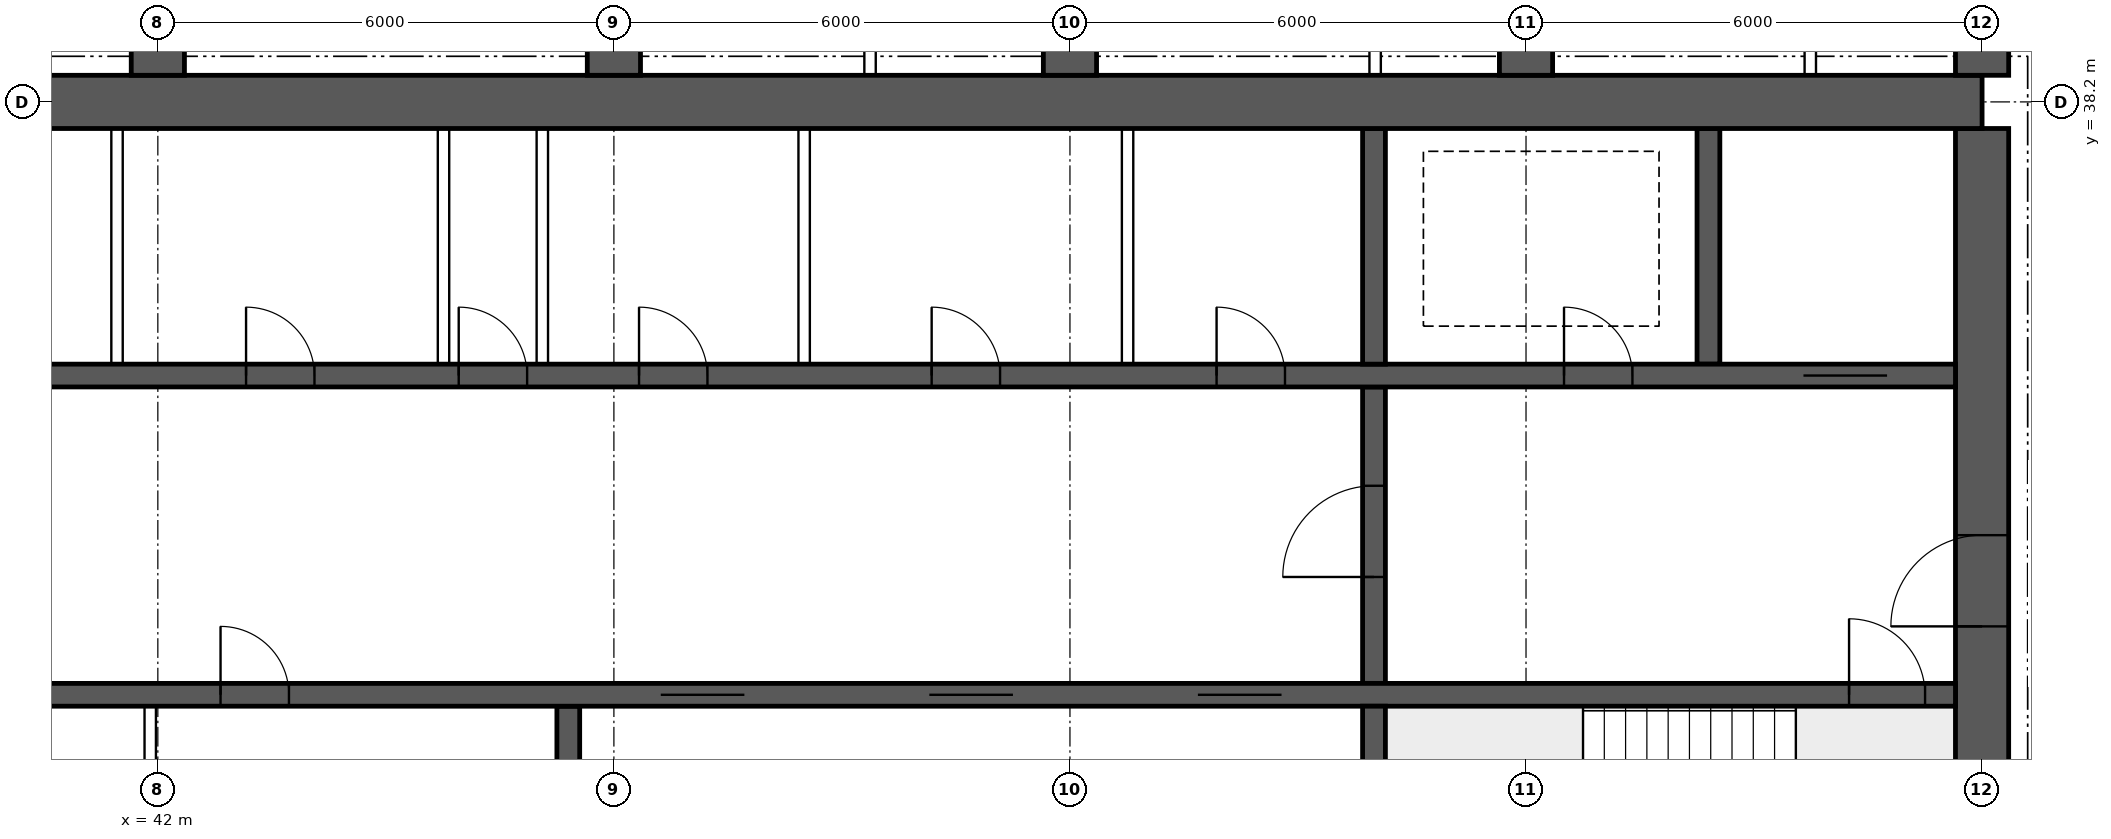
"""IFC4 building model, lengths in metres.
Left out: names, types, materials, properties, quantities, classifications, styles, units other than length and angle.
Written with IfcOpenShell. Run it as: python <this file> out.ifc"""

import sys

from ifc_helpers import new_model, si_unit, direction, frame, frame_2d, origin, place, context, subcontext, project, spatial, rectangle, extrude, element, fill, save


model = new_model("IFC4")
c1 = context("Model", 3, precision=1e-05, world=origin(), true_north=direction((0.0, 1.0)))
c2 = subcontext(c1, "Body", "Model", "MODEL_VIEW")
j1 = project(units=[si_unit("LENGTHUNIT", "METRE"), si_unit("PLANEANGLEUNIT", "RADIAN")], contexts=[c1])
p1 = place(None, origin())
s1 = spatial("IfcSite", under=j1, at=p1, CompositionType="ELEMENT")
p2 = place(p1, origin())
s2 = spatial("IfcBuilding", under=s1, at=p2, CompositionType="ELEMENT")
p3 = place(p2, frame((0.0, 0.0, 216.55)))
s3 = spatial("IfcBuildingStorey", under=s2, at=p3, CompositionType="ELEMENT", Elevation=216.55)
p4 = place(p3, frame((18.0, 38.2, 0.0), z_axis=(0.0, 0.0, 1.0), x_axis=(1.0, 0.0, 0.0)))
e1 = element("IfcWall", 1, at=p4, inside=s3, PredefinedType="SHEAR", context=c2, shape_type="SweptSolid", body=[
    extrude(rectangle(XDim=48.0, YDim=0.7, at=frame_2d((24.0, 0.0))), origin(), (0.0, 0.0, 1.0), 3.75),
])
p5 = place(p3, frame((66.0, 26.15, 0.0), z_axis=(0.0, 0.0, 1.0), x_axis=(0.0, 1.0, 0.0)))
e2 = element("IfcWall", 2, at=p5, inside=s3, PredefinedType="SHEAR", context=c2, shape_type="SweptSolid", body=[
    extrude(rectangle(XDim=11.7, YDim=0.7, at=frame_2d((5.85, 0.0))), origin(), (0.0, 0.0, 1.0), 3.75),
])
p6 = place(p5, frame((5.15, 0.0, 0.0)))
e3 = element("IfcOpeningElement", 3, at=p6, cuts=e2, PredefinedType="OPENING", context=c2, shape_type="SweptSolid", body=[
    extrude(rectangle(XDim=1.2, YDim=2.1, at=frame_2d((0.6, 1.05))), frame((0.0, 0.36, 0.0), z_axis=(0.0, -1.0, 0.0), x_axis=(1.0, 0.0, 0.0)), (0.0, 0.0, 1.0), 0.72),
])
p7 = place(p3, frame((18.35, 30.4, 0.0), z_axis=(0.0, 0.0, 1.0), x_axis=(1.0, 0.0, 0.0)))
e4 = element("IfcWall", 4, at=p7, inside=s3, PredefinedType="SHEAR", context=c2, shape_type="SweptSolid", body=[
    extrude(rectangle(XDim=47.3, YDim=0.3, at=frame_2d((23.65, 0.0))), origin(), (0.0, 0.0, 1.0), 3.75),
])
p8 = place(p7, frame((0.4, 0.0, 0.0)))
e5 = element("IfcOpeningElement", 5, at=p8, cuts=e4, PredefinedType="OPENING", context=c2, shape_type="SweptSolid", body=[
    extrude(rectangle(XDim=1.0, YDim=2.1, at=frame_2d((0.5, 1.05))), frame((0.0, 0.16, 0.0), z_axis=(0.0, -1.0, 0.0), x_axis=(1.0, 0.0, 0.0)), (0.0, 0.0, 1.0), 0.32),
])
p9 = place(p7, frame((45.9, 0.0, 0.0)))
e6 = element("IfcOpeningElement", 6, at=p9, cuts=e4, PredefinedType="OPENING", context=c2, shape_type="SweptSolid", body=[
    extrude(rectangle(XDim=1.0, YDim=2.1, at=frame_2d((0.5, 1.05))), frame((0.0, 0.16, 0.0), z_axis=(0.0, -1.0, 0.0), x_axis=(1.0, 0.0, 0.0)), (0.0, 0.0, 1.0), 0.32),
])
p10 = place(p7, frame((8.4, 0.0, 0.0)))
e7 = element("IfcOpeningElement", 7, at=p10, cuts=e4, PredefinedType="OPENING", context=c2, shape_type="SweptSolid", body=[
    extrude(rectangle(XDim=1.1, YDim=2.1, at=frame_2d((0.55, 1.05))), frame((0.0, 0.16, 0.0), z_axis=(0.0, -1.0, 0.0), x_axis=(1.0, 0.0, 0.0)), (0.0, 0.0, 1.0), 0.32),
])
p11 = place(p7, frame((11.0, 0.0, 0.0)))
e8 = element("IfcOpeningElement", 8, at=p11, cuts=e4, PredefinedType="OPENING", context=c2, shape_type="SweptSolid", body=[
    extrude(rectangle(XDim=1.1, YDim=2.1, at=frame_2d((0.55, 1.05))), frame((0.0, 0.16, 0.0), z_axis=(0.0, -1.0, 0.0), x_axis=(1.0, 0.0, 0.0)), (0.0, 0.0, 1.0), 0.32),
])
p12 = place(p7, frame((13.6, 0.0, 0.0)))
e9 = element("IfcOpeningElement", 9, at=p12, cuts=e4, PredefinedType="OPENING", context=c2, shape_type="SweptSolid", body=[
    extrude(rectangle(XDim=1.1, YDim=2.1, at=frame_2d((0.55, 1.05))), frame((0.0, 0.16, 0.0), z_axis=(0.0, -1.0, 0.0), x_axis=(1.0, 0.0, 0.0)), (0.0, 0.0, 1.0), 0.32),
])
p13 = place(p7, frame((16.2, 0.0, 0.0)))
e10 = element("IfcOpeningElement", 10, at=p13, cuts=e4, PredefinedType="OPENING", context=c2, shape_type="SweptSolid", body=[
    extrude(rectangle(XDim=1.1, YDim=2.1, at=frame_2d((0.55, 1.05))), frame((0.0, 0.16, 0.0), z_axis=(0.0, -1.0, 0.0), x_axis=(1.0, 0.0, 0.0)), (0.0, 0.0, 1.0), 0.32),
])
p14 = place(p7, frame((18.975, 0.0, 0.0)))
e11 = element("IfcOpeningElement", 11, at=p14, cuts=e4, PredefinedType="OPENING", context=c2, shape_type="SweptSolid", body=[
    extrude(rectangle(XDim=0.9, YDim=2.1, at=frame_2d((0.45, 1.05))), frame((0.0, 0.16, 0.0), z_axis=(0.0, -1.0, 0.0), x_axis=(1.0, 0.0, 0.0)), (0.0, 0.0, 1.0), 0.32),
])
p15 = place(p7, frame((24.475, 0.0, 0.0)))
e12 = element("IfcOpeningElement", 12, at=p15, cuts=e4, PredefinedType="OPENING", context=c2, shape_type="SweptSolid", body=[
    extrude(rectangle(XDim=0.9, YDim=2.1, at=frame_2d((0.45, 1.05))), frame((0.0, 0.16, 0.0), z_axis=(0.0, -1.0, 0.0), x_axis=(1.0, 0.0, 0.0)), (0.0, 0.0, 1.0), 0.32),
])
p16 = place(p7, frame((30.267, 0.0, 0.0)))
e13 = element("IfcOpeningElement", 13, at=p16, cuts=e4, PredefinedType="OPENING", context=c2, shape_type="SweptSolid", body=[
    extrude(rectangle(XDim=1.1, YDim=2.1, at=frame_2d((0.55, 1.05))), frame((0.0, 0.16, 0.0), z_axis=(0.0, -1.0, 0.0), x_axis=(1.0, 0.0, 0.0)), (0.0, 0.0, 1.0), 0.32),
])
p17 = place(p7, frame((33.8, 0.0, 0.0)))
e14 = element("IfcOpeningElement", 14, at=p17, cuts=e4, PredefinedType="OPENING", context=c2, shape_type="SweptSolid", body=[
    extrude(rectangle(XDim=1.1, YDim=2.1, at=frame_2d((0.55, 1.05))), frame((0.0, 0.16, 0.0), z_axis=(0.0, -1.0, 0.0), x_axis=(1.0, 0.0, 0.0)), (0.0, 0.0, 1.0), 0.32),
])
p18 = place(p7, frame((37.333, 0.0, 0.0)))
e15 = element("IfcOpeningElement", 15, at=p18, cuts=e4, PredefinedType="OPENING", context=c2, shape_type="SweptSolid", body=[
    extrude(rectangle(XDim=1.1, YDim=2.1, at=frame_2d((0.55, 1.05))), frame((0.0, 0.16, 0.0), z_axis=(0.0, -1.0, 0.0), x_axis=(1.0, 0.0, 0.0)), (0.0, 0.0, 1.0), 0.32),
])
p19 = place(p3, frame((18.35, 34.6, 0.0), z_axis=(0.0, 0.0, 1.0), x_axis=(1.0, 0.0, 0.0)))
e16 = element("IfcWall", 16, at=p19, inside=s3, PredefinedType="SHEAR", context=c2, shape_type="SweptSolid", body=[
    extrude(rectangle(XDim=47.3, YDim=0.3, at=frame_2d((23.65, 0.0))), origin(), (0.0, 0.0, 1.0), 3.75),
])
p20 = place(p19, frame((0.9, 0.0, 0.0)))
e17 = element("IfcOpeningElement", 17, at=p20, cuts=e16, PredefinedType="OPENING", context=c2, shape_type="SweptSolid", body=[
    extrude(rectangle(XDim=1.1, YDim=2.1, at=frame_2d((0.55, 1.05))), frame((0.0, 0.16, 0.0), z_axis=(0.0, -1.0, 0.0), x_axis=(1.0, 0.0, 0.0)), (0.0, 0.0, 1.0), 0.32),
])
p21 = place(p19, frame((45.3, 0.0, 0.0)))
e18 = element("IfcOpeningElement", 18, at=p21, cuts=e16, PredefinedType="OPENING", context=c2, shape_type="SweptSolid", body=[
    extrude(rectangle(XDim=1.1, YDim=2.1, at=frame_2d((0.55, 1.05))), frame((0.0, 0.16, 0.0), z_axis=(0.0, -1.0, 0.0), x_axis=(1.0, 0.0, 0.0)), (0.0, 0.0, 1.0), 0.32),
])
p22 = place(p19, frame((4.25, 0.0, 0.0)))
e19 = element("IfcOpeningElement", 19, at=p22, cuts=e16, PredefinedType="OPENING", context=c2, shape_type="SweptSolid", body=[
    extrude(rectangle(XDim=0.9, YDim=2.1, at=frame_2d((0.45, 1.05))), frame((0.0, 0.16, 0.0), z_axis=(0.0, -1.0, 0.0), x_axis=(1.0, 0.0, 0.0)), (0.0, 0.0, 1.0), 0.32),
])
p23 = place(p19, frame((42.15, 0.0, 0.0)))
e20 = element("IfcOpeningElement", 20, at=p23, cuts=e16, PredefinedType="OPENING", context=c2, shape_type="SweptSolid", body=[
    extrude(rectangle(XDim=0.9, YDim=2.1, at=frame_2d((0.45, 1.05))), frame((0.0, 0.16, 0.0), z_axis=(0.0, -1.0, 0.0), x_axis=(1.0, 0.0, 0.0)), (0.0, 0.0, 1.0), 0.32),
])
p24 = place(p19, frame((9.025, 0.0, 0.0)))
e21 = element("IfcOpeningElement", 21, at=p24, cuts=e16, PredefinedType="OPENING", context=c2, shape_type="SweptSolid", body=[
    extrude(rectangle(XDim=0.9, YDim=2.1, at=frame_2d((0.45, 1.05))), frame((0.0, 0.16, 0.0), z_axis=(0.0, -1.0, 0.0), x_axis=(1.0, 0.0, 0.0)), (0.0, 0.0, 1.0), 0.32),
])
p25 = place(p19, frame((12.999, 0.0, 0.0)))
e22 = element("IfcOpeningElement", 22, at=p25, cuts=e16, PredefinedType="OPENING", context=c2, shape_type="SweptSolid", body=[
    extrude(rectangle(XDim=0.9, YDim=2.1, at=frame_2d((0.45, 1.05))), frame((0.0, 0.16, 0.0), z_axis=(0.0, -1.0, 0.0), x_axis=(1.0, 0.0, 0.0)), (0.0, 0.0, 1.0), 0.32),
])
p26 = place(p19, frame((16.646, 0.0, 0.0)))
e23 = element("IfcOpeningElement", 23, at=p26, cuts=e16, PredefinedType="OPENING", context=c2, shape_type="SweptSolid", body=[
    extrude(rectangle(XDim=0.9, YDim=2.1, at=frame_2d((0.45, 1.05))), frame((0.0, 0.16, 0.0), z_axis=(0.0, -1.0, 0.0), x_axis=(1.0, 0.0, 0.0)), (0.0, 0.0, 1.0), 0.32),
])
p27 = place(p19, frame((20.405, 0.0, 0.0)))
e24 = element("IfcOpeningElement", 24, at=p27, cuts=e16, PredefinedType="OPENING", context=c2, shape_type="SweptSolid", body=[
    extrude(rectangle(XDim=0.9, YDim=2.1, at=frame_2d((0.45, 1.05))), frame((0.0, 0.16, 0.0), z_axis=(0.0, -1.0, 0.0), x_axis=(1.0, 0.0, 0.0)), (0.0, 0.0, 1.0), 0.32),
])
p28 = place(p19, frame((24.811, 0.0, 0.0)))
e25 = element("IfcOpeningElement", 25, at=p28, cuts=e16, PredefinedType="OPENING", context=c2, shape_type="SweptSolid", body=[
    extrude(rectangle(XDim=0.9, YDim=2.1, at=frame_2d((0.45, 1.05))), frame((0.0, 0.16, 0.0), z_axis=(0.0, -1.0, 0.0), x_axis=(1.0, 0.0, 0.0)), (0.0, 0.0, 1.0), 0.32),
])
p29 = place(p19, frame((27.608, 0.0, 0.0)))
e26 = element("IfcOpeningElement", 26, at=p29, cuts=e16, PredefinedType="OPENING", context=c2, shape_type="SweptSolid", body=[
    extrude(rectangle(XDim=0.9, YDim=2.1, at=frame_2d((0.45, 1.05))), frame((0.0, 0.16, 0.0), z_axis=(0.0, -1.0, 0.0), x_axis=(1.0, 0.0, 0.0)), (0.0, 0.0, 1.0), 0.32),
])
p30 = place(p19, frame((29.981, 0.0, 0.0)))
e27 = element("IfcOpeningElement", 27, at=p30, cuts=e16, PredefinedType="OPENING", context=c2, shape_type="SweptSolid", body=[
    extrude(rectangle(XDim=0.9, YDim=2.1, at=frame_2d((0.45, 1.05))), frame((0.0, 0.16, 0.0), z_axis=(0.0, -1.0, 0.0), x_axis=(1.0, 0.0, 0.0)), (0.0, 0.0, 1.0), 0.32),
])
p31 = place(p19, frame((33.831, 0.0, 0.0)))
e28 = element("IfcOpeningElement", 28, at=p31, cuts=e16, PredefinedType="OPENING", context=c2, shape_type="SweptSolid", body=[
    extrude(rectangle(XDim=0.9, YDim=2.1, at=frame_2d((0.45, 1.05))), frame((0.0, 0.16, 0.0), z_axis=(0.0, -1.0, 0.0), x_axis=(1.0, 0.0, 0.0)), (0.0, 0.0, 1.0), 0.32),
])
p32 = place(p19, frame((37.579, 0.0, 0.0)))
e29 = element("IfcOpeningElement", 29, at=p32, cuts=e16, PredefinedType="OPENING", context=c2, shape_type="SweptSolid", body=[
    extrude(rectangle(XDim=0.9, YDim=2.1, at=frame_2d((0.45, 1.05))), frame((0.0, 0.16, 0.0), z_axis=(0.0, -1.0, 0.0), x_axis=(1.0, 0.0, 0.0)), (0.0, 0.0, 1.0), 0.32),
])
p33 = place(p3, frame((58.0, 26.15, 0.0), z_axis=(0.0, 0.0, 1.0), x_axis=(0.0, 1.0, 0.0)))
e30 = element("IfcWall", 30, at=p33, inside=s3, PredefinedType="SHEAR", context=c2, shape_type="SweptSolid", body=[
    extrude(rectangle(XDim=4.1, YDim=0.3, at=frame_2d((2.05, 0.0))), origin(), (0.0, 0.0, 1.0), 3.75),
])
p34 = place(p3, frame((58.0, 30.55, 0.0), z_axis=(0.0, 0.0, 1.0), x_axis=(0.0, 1.0, 0.0)))
e31 = element("IfcWall", 31, at=p34, inside=s3, PredefinedType="SHEAR", context=c2, shape_type="SweptSolid", body=[
    extrude(rectangle(XDim=3.9, YDim=0.3, at=frame_2d((1.95, 0.0))), origin(), (0.0, 0.0, 1.0), 3.75),
])
p35 = place(p34, frame((1.4, 0.0, 0.0)))
e32 = element("IfcOpeningElement", 32, at=p35, cuts=e31, PredefinedType="OPENING", context=c2, shape_type="SweptSolid", body=[
    extrude(rectangle(XDim=1.2, YDim=2.1, at=frame_2d((0.6, 1.05))), frame((0.0, 0.16, 0.0), z_axis=(0.0, -1.0, 0.0), x_axis=(1.0, 0.0, 0.0)), (0.0, 0.0, 1.0), 0.32),
])
for number, where, z_axis, x_axis in (
    (33, (62.4, 34.75, 0.0), (0.0, 0.0, 1.0), (0.0, 1.0, 0.0)),
    (34, (58.0, 34.75, 0.0), (0.0, 0.0, 1.0), (0.0, 1.0, 0.0)),
):
    element("IfcWall", number, at=place(p3, frame(where, z_axis=z_axis, x_axis=x_axis)), inside=s3, PredefinedType="SHEAR", context=c2, shape_type="SweptSolid", body=[
        extrude(rectangle(XDim=3.1, YDim=0.3, at=frame_2d((1.55, 0.0))), origin(), (0.0, 0.0, 1.0), 3.75),
    ])
p36 = place(p3, frame((47.4, 26.15, 0.0), z_axis=(0.0, 0.0, 1.0), x_axis=(0.0, 1.0, 0.0)))
e35 = element("IfcWall", 35, at=p36, inside=s3, PredefinedType="SHEAR", context=c2, shape_type="SweptSolid", body=[
    extrude(rectangle(XDim=4.1, YDim=0.3, at=frame_2d((2.05, 0.0))), origin(), (0.0, 0.0, 1.0), 3.75),
])
for number, where, z_axis, x_axis in (
    (36, (42.0, 38.55, 0.0), (0.0, 0.0, 1.0), (0.0, 1.0, 0.0)),
    (37, (48.0, 38.55, 0.0), (0.0, 0.0, 1.0), (0.0, 1.0, 0.0)),
    (38, (54.0, 38.55, 0.0), (0.0, 0.0, 1.0), (0.0, 1.0, 0.0)),
    (39, (60.0, 38.55, 0.0), (0.0, 0.0, 1.0), (0.0, 1.0, 0.0)),
    (40, (66.0, 38.55, 0.0), (0.0, 0.0, 1.0), (0.0, 1.0, 0.0)),
):
    element("IfcWall", number, at=place(p3, frame(where, z_axis=z_axis, x_axis=x_axis)), inside=s3, PredefinedType="SHEAR", context=c2, shape_type="SweptSolid", body=[
        extrude(rectangle(XDim=7.05, YDim=0.7, at=frame_2d((3.525, 0.0))), origin(), (0.0, 0.0, 1.0), 3.75),
    ])
for number, where, z_axis, x_axis in (
    (41, (41.463, 34.75, 0.0), (0.0, 0.0, 1.0), (0.0, 1.0, 0.0)),
    (42, (45.758, 34.75, 0.0), (0.0, 0.0, 1.0), (0.0, 1.0, 0.0)),
    (43, (47.058, 34.75, 0.0), (0.0, 0.0, 1.0), (0.0, 1.0, 0.0)),
    (44, (50.503, 34.75, 0.0), (0.0, 0.0, 1.0), (0.0, 1.0, 0.0)),
    (45, (54.758, 34.75, 0.0), (0.0, 0.0, 1.0), (0.0, 1.0, 0.0)),
):
    element("IfcWall", number, at=place(p3, frame(where, z_axis=z_axis, x_axis=x_axis)), inside=s3, PredefinedType="SOLIDWALL", context=c2, shape_type="SweptSolid", body=[
        extrude(rectangle(XDim=3.1, YDim=0.15, at=frame_2d((1.55, 0.0))), origin(), (0.0, 0.0, 1.0), 3.5),
    ])
p37 = place(p3, frame((41.9, 26.15, 0.0), z_axis=(0.0, 0.0, 1.0), x_axis=(0.0, 1.0, 0.0)))
e46 = element("IfcWall", 46, at=p37, inside=s3, PredefinedType="SOLIDWALL", context=c2, shape_type="SweptSolid", body=[
    extrude(rectangle(XDim=4.1, YDim=0.15, at=frame_2d((2.05, 0.0))), origin(), (0.0, 0.0, 1.0), 3.5),
])
for number, where, z_axis, x_axis in (
    (47, (51.37, 38.55, 0.0), (0.0, 0.0, 1.0), (0.0, 1.0, 0.0)),
    (48, (58.015, 38.55, 0.0), (0.0, 0.0, 1.0), (0.0, 1.0, 0.0)),
    (49, (63.74, 38.55, 0.0), (0.0, 0.0, 1.0), (0.0, 1.0, 0.0)),
):
    element("IfcWall", number, at=place(p3, frame(where, z_axis=z_axis, x_axis=x_axis)), inside=s3, PredefinedType="PARTITIONING", context=c2, shape_type="SweptSolid", body=[
        extrude(rectangle(XDim=6.95, YDim=0.15, at=frame_2d((3.475, 0.0))), origin(), (0.0, 0.0, 1.0), 3.5),
    ])
p38 = place(p6, origin())
e50 = element("IfcDoor", 50, at=p38, inside=s3, OperationType="SINGLE_SWING_LEFT", PredefinedType="DOOR", context=c2, shape_type="SweptSolid", body=[
    extrude(rectangle(XDim=1.2, YDim=2.1, at=frame_2d((0.6, 1.05))), frame((0.0, 0.025, 0.0), z_axis=(0.0, -1.0, 0.0), x_axis=(1.0, 0.0, 0.0)), (0.0, 0.0, 1.0), 0.05),
])
fill(e3, e50)
p39 = place(p9, origin())
e51 = element("IfcDoor", 51, at=p39, inside=s3, OperationType="SINGLE_SWING_LEFT", PredefinedType="DOOR", context=c2, shape_type="SweptSolid", body=[
    extrude(rectangle(XDim=1.0, YDim=2.1, at=frame_2d((0.5, 1.05))), frame((0.0, 0.025, 0.0), z_axis=(0.0, -1.0, 0.0), x_axis=(1.0, 0.0, 0.0)), (0.0, 0.0, 1.0), 0.05),
])
fill(e6, e51)
p40 = place(p21, origin())
e52 = element("IfcDoor", 52, at=p40, inside=s3, OperationType="DOUBLE_DOOR_SLIDING", PredefinedType="DOOR", context=c2, shape_type="SweptSolid", body=[
    extrude(rectangle(XDim=1.1, YDim=2.1, at=frame_2d((0.55, 1.05))), frame((0.0, 0.025, 0.0), z_axis=(0.0, -1.0, 0.0), x_axis=(1.0, 0.0, 0.0)), (0.0, 0.0, 1.0), 0.05),
])
fill(e18, e52)
p41 = place(p23, origin())
e53 = element("IfcDoor", 53, at=p41, inside=s3, OperationType="SINGLE_SWING_LEFT", PredefinedType="DOOR", context=c2, shape_type="SweptSolid", body=[
    extrude(rectangle(XDim=0.9, YDim=2.1, at=frame_2d((0.45, 1.05))), frame((0.0, 0.025, 0.0), z_axis=(0.0, -1.0, 0.0), x_axis=(1.0, 0.0, 0.0)), (0.0, 0.0, 1.0), 0.05),
])
fill(e20, e53)
p42 = place(p35, origin())
e54 = element("IfcDoor", 54, at=p42, inside=s3, OperationType="SINGLE_SWING_LEFT", PredefinedType="DOOR", context=c2, shape_type="SweptSolid", body=[
    extrude(rectangle(XDim=1.2, YDim=2.1, at=frame_2d((0.6, 1.05))), frame((0.0, 0.025, 0.0), z_axis=(0.0, -1.0, 0.0), x_axis=(1.0, 0.0, 0.0)), (0.0, 0.0, 1.0), 0.05),
])
fill(e32, e54)
p43 = place(p28, origin())
e55 = element("IfcDoor", 55, at=p43, inside=s3, OperationType="SINGLE_SWING_LEFT", PredefinedType="DOOR", context=c2, shape_type="SweptSolid", body=[
    extrude(rectangle(XDim=0.9, YDim=2.1, at=frame_2d((0.45, 1.05))), frame((0.0, 0.025, 0.0), z_axis=(0.0, -1.0, 0.0), x_axis=(1.0, 0.0, 0.0)), (0.0, 0.0, 1.0), 0.05),
])
fill(e25, e55)
p44 = place(p29, origin())
e56 = element("IfcDoor", 56, at=p44, inside=s3, OperationType="SINGLE_SWING_LEFT", PredefinedType="DOOR", context=c2, shape_type="SweptSolid", body=[
    extrude(rectangle(XDim=0.9, YDim=2.1, at=frame_2d((0.45, 1.05))), frame((0.0, 0.025, 0.0), z_axis=(0.0, -1.0, 0.0), x_axis=(1.0, 0.0, 0.0)), (0.0, 0.0, 1.0), 0.05),
])
fill(e26, e56)
p45 = place(p30, origin())
e57 = element("IfcDoor", 57, at=p45, inside=s3, OperationType="SINGLE_SWING_LEFT", PredefinedType="DOOR", context=c2, shape_type="SweptSolid", body=[
    extrude(rectangle(XDim=0.9, YDim=2.1, at=frame_2d((0.45, 1.05))), frame((0.0, 0.025, 0.0), z_axis=(0.0, -1.0, 0.0), x_axis=(1.0, 0.0, 0.0)), (0.0, 0.0, 1.0), 0.05),
])
fill(e27, e57)
p46 = place(p31, origin())
e58 = element("IfcDoor", 58, at=p46, inside=s3, OperationType="SINGLE_SWING_LEFT", PredefinedType="DOOR", context=c2, shape_type="SweptSolid", body=[
    extrude(rectangle(XDim=0.9, YDim=2.1, at=frame_2d((0.45, 1.05))), frame((0.0, 0.025, 0.0), z_axis=(0.0, -1.0, 0.0), x_axis=(1.0, 0.0, 0.0)), (0.0, 0.0, 1.0), 0.05),
])
fill(e28, e58)
p47 = place(p32, origin())
e59 = element("IfcDoor", 59, at=p47, inside=s3, OperationType="SINGLE_SWING_LEFT", PredefinedType="DOOR", context=c2, shape_type="SweptSolid", body=[
    extrude(rectangle(XDim=0.9, YDim=2.1, at=frame_2d((0.45, 1.05))), frame((0.0, 0.025, 0.0), z_axis=(0.0, -1.0, 0.0), x_axis=(1.0, 0.0, 0.0)), (0.0, 0.0, 1.0), 0.05),
])
fill(e29, e59)
p48 = place(p15, origin())
e60 = element("IfcDoor", 60, at=p48, inside=s3, OperationType="SINGLE_SWING_LEFT", PredefinedType="DOOR", context=c2, shape_type="SweptSolid", body=[
    extrude(rectangle(XDim=0.9, YDim=2.1, at=frame_2d((0.45, 1.05))), frame((0.0, 0.025, 0.0), z_axis=(0.0, -1.0, 0.0), x_axis=(1.0, 0.0, 0.0)), (0.0, 0.0, 1.0), 0.05),
])
fill(e12, e60)
p49 = place(p16, origin())
e61 = element("IfcDoor", 61, at=p49, inside=s3, OperationType="DOUBLE_DOOR_SLIDING", PredefinedType="DOOR", context=c2, shape_type="SweptSolid", body=[
    extrude(rectangle(XDim=1.1, YDim=2.1, at=frame_2d((0.55, 1.05))), frame((0.0, 0.025, 0.0), z_axis=(0.0, -1.0, 0.0), x_axis=(1.0, 0.0, 0.0)), (0.0, 0.0, 1.0), 0.05),
])
fill(e13, e61)
p50 = place(p17, origin())
e62 = element("IfcDoor", 62, at=p50, inside=s3, OperationType="DOUBLE_DOOR_SLIDING", PredefinedType="DOOR", context=c2, shape_type="SweptSolid", body=[
    extrude(rectangle(XDim=1.1, YDim=2.1, at=frame_2d((0.55, 1.05))), frame((0.0, 0.025, 0.0), z_axis=(0.0, -1.0, 0.0), x_axis=(1.0, 0.0, 0.0)), (0.0, 0.0, 1.0), 0.05),
])
fill(e14, e62)
p51 = place(p18, origin())
e63 = element("IfcDoor", 63, at=p51, inside=s3, OperationType="DOUBLE_DOOR_SLIDING", PredefinedType="DOOR", context=c2, shape_type="SweptSolid", body=[
    extrude(rectangle(XDim=1.1, YDim=2.1, at=frame_2d((0.55, 1.05))), frame((0.0, 0.025, 0.0), z_axis=(0.0, -1.0, 0.0), x_axis=(1.0, 0.0, 0.0)), (0.0, 0.0, 1.0), 0.05),
])
fill(e15, e63)
save(model, sys.argv[1])
